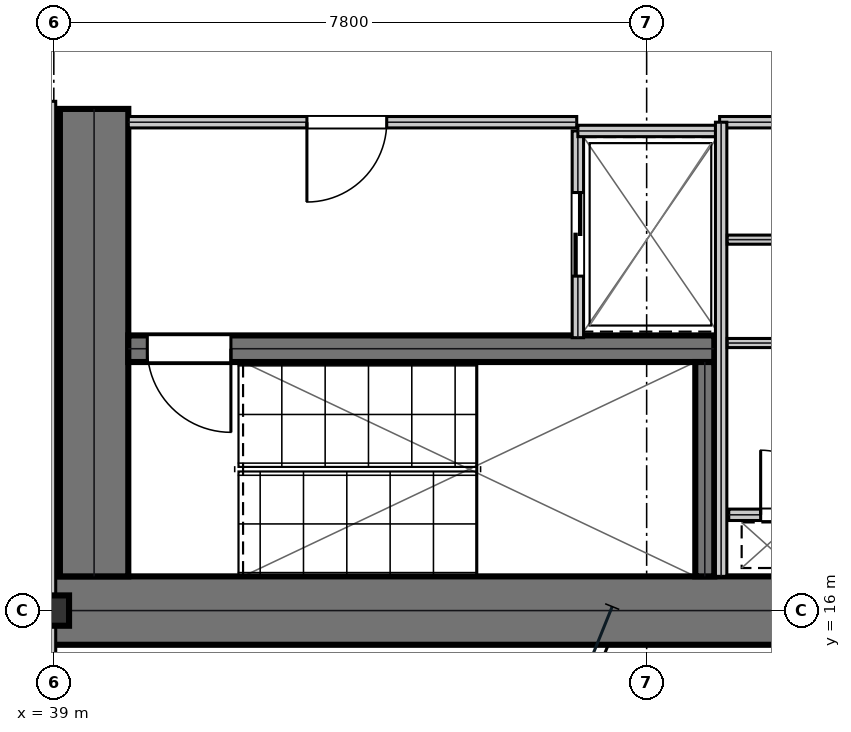
"""IFC4 building model, lengths in metres.
Left out: names, types, materials, properties, quantities, classifications, styles, units other than length and angle.
Written with IfcOpenShell. Run it as: python <this file> out.ifc"""

import sys

from ifc_helpers import new_model, si_unit, direction, frame, frame_2d, origin, origin_2d, place, context, subcontext, project, spatial, rectangle, i_section, extrude, element, fill, save


model = new_model("IFC4")
c1 = context("Model", 3, precision=1e-05, world=origin(), true_north=direction((0.0, 1.0)))
c2 = subcontext(c1, "Body", "Model", "MODEL_VIEW")
j1 = project(units=[si_unit("LENGTHUNIT", "METRE"), si_unit("PLANEANGLEUNIT", "RADIAN")], contexts=[c1])
p1 = place(None, origin())
s1 = spatial("IfcSite", under=j1, at=p1, CompositionType="ELEMENT")
p2 = place(p1, origin())
s2 = spatial("IfcBuilding", under=s1, at=p2, CompositionType="ELEMENT")
p3 = place(p2, frame((0.0, 0.0, 70.2)))
s3 = spatial("IfcBuildingStorey", under=s2, at=p3, CompositionType="ELEMENT", Elevation=70.2)
p4 = place(p3, frame((38.8, 16.0, 0.0), z_axis=(0.0, 0.0, 1.0), x_axis=(1.0, 0.0, 0.0)))
e1 = element("IfcWall", 1, at=p4, inside=s3, PredefinedType="SHEAR", context=c2, shape_type="SweptSolid", body=[
    extrude(rectangle(XDim=16.0, YDim=0.9, at=frame_2d((8.0, 0.0))), origin(), (0.0, 0.0, 1.0), 3.81),
])
p5 = place(p3, frame((39.53, 16.45, 0.0), z_axis=(0.0, 0.0, 1.0), x_axis=(0.0, 1.0, 0.0)))
e2 = element("IfcWall", 2, at=p5, inside=s3, PredefinedType="SHEAR", context=c2, shape_type="SweptSolid", body=[
    extrude(rectangle(XDim=6.15, YDim=0.9, at=frame_2d((3.075, 0.0))), origin(), (0.0, 0.0, 1.0), 3.81),
])
p6 = place(p3, frame((39.98, 19.445, 0.0), z_axis=(0.0, 0.0, 1.0), x_axis=(1.0, 0.0, 0.0)))
e3 = element("IfcWall", 3, at=p6, inside=s3, PredefinedType="SHEAR", context=c2, shape_type="SweptSolid", body=[
    extrude(rectangle(XDim=7.71, YDim=0.35, at=frame_2d((3.855, 0.0))), origin(), (0.0, 0.0, 1.0), 3.81),
])
p7 = place(p6, frame((0.25, 0.0, 0.0)))
e4 = element("IfcOpeningElement", 4, at=p7, cuts=e3, PredefinedType="OPENING", context=c2, shape_type="SweptSolid", body=[
    extrude(rectangle(XDim=1.1, YDim=2.15, at=frame_2d((0.55, 1.075))), frame((0.0, 0.185, 0.0), z_axis=(0.0, -1.0, 0.0), x_axis=(1.0, 0.0, 0.0)), (0.0, 0.0, 1.0), 0.37),
])
p8 = place(p3, frame((47.565, 16.45, 0.0), z_axis=(0.0, 0.0, 1.0), x_axis=(0.0, 1.0, 0.0)))
e5 = element("IfcWall", 5, at=p8, inside=s3, PredefinedType="SHEAR", context=c2, shape_type="SweptSolid", body=[
    extrude(rectangle(XDim=2.82, YDim=0.25, at=frame_2d((1.41, 0.0))), origin(), (0.0, 0.0, 1.0), 3.81),
])
p9 = place(p3, frame((39.0, 16.0, 0.0), z_axis=(0.0, 0.0, 1.0), x_axis=(1.0, 0.0, 0.0)))
e6 = element("IfcColumn", 6, at=p9, inside=s3, PredefinedType="COLUMN", context=c2, shape_type="SweptSolid", body=[
    extrude(i_section(OverallWidth=0.401, OverallDepth=0.399, WebThickness=0.025, FlangeThickness=0.04, at=origin_2d()), origin(), (0.0, 0.0, 1.0), 4.044),
])
p10 = place(p3, frame((39.98, 22.425, 0.0), z_axis=(0.0, 0.0, 1.0), x_axis=(1.0, 0.0, 0.0)))
e7 = element("IfcWall", 7, at=p10, inside=s3, PredefinedType="PARTITIONING", context=c2, shape_type="SweptSolid", body=[
    extrude(rectangle(XDim=5.9, YDim=0.15, at=frame_2d((2.95, 0.0))), origin(), (0.0, 0.0, 1.0), 3.81),
])
p11 = place(p10, frame((2.35, 0.0, 0.0)))
e8 = element("IfcOpeningElement", 8, at=p11, cuts=e7, PredefinedType="OPENING", context=c2, shape_type="SweptSolid", body=[
    extrude(rectangle(XDim=1.05, YDim=2.15, at=frame_2d((0.525, 1.075))), frame((0.0, 0.085, 0.0), z_axis=(0.0, -1.0, 0.0), x_axis=(1.0, 0.0, 0.0)), (0.0, 0.0, 1.0), 0.17),
])
p12 = place(p3, frame((45.895, 19.59, 0.0), z_axis=(0.0, 0.0, 1.0), x_axis=(0.0, 1.0, 0.0)))
e9 = element("IfcWall", 9, at=p12, inside=s3, PredefinedType="PARTITIONING", context=c2, shape_type="SweptSolid", body=[
    extrude(rectangle(XDim=2.72, YDim=0.15, at=frame_2d((1.36, 0.0))), origin(), (0.0, 0.0, 1.0), 3.81),
])
p13 = place(p12, frame((0.81, 0.0, 0.0)))
e10 = element("IfcOpeningElement", 10, at=p13, cuts=e9, PredefinedType="OPENING", context=c2, shape_type="SweptSolid", body=[
    extrude(rectangle(XDim=1.1, YDim=2.15, at=frame_2d((0.55, 1.075))), frame((0.0, 0.085, 0.0), z_axis=(0.0, -1.0, 0.0), x_axis=(1.0, 0.0, 0.0)), (0.0, 0.0, 1.0), 0.17),
])
p14 = place(p3, frame((45.895, 22.31, 0.0), z_axis=(0.0, 0.0, 1.0), x_axis=(1.0, 0.0, 0.0)))
e11 = element("IfcWall", 11, at=p14, inside=s3, PredefinedType="PARTITIONING", context=c2, shape_type="SweptSolid", body=[
    extrude(rectangle(XDim=1.915, YDim=0.15, at=frame_2d((0.958, 0.0))), origin(), (0.0, 0.0, 1.0), 3.81),
])
p15 = place(p3, frame((47.88, 17.26, 0.0), z_axis=(0.0, 0.0, 1.0), x_axis=(1.0, 0.0, 0.0)))
e12 = element("IfcWall", 12, at=p15, inside=s3, PredefinedType="PARTITIONING", context=c2, shape_type="SweptSolid", body=[
    extrude(rectangle(XDim=1.72, YDim=0.15, at=frame_2d((0.86, 0.0))), origin(), (0.0, 0.0, 1.0), 3.81),
])
p16 = place(p15, frame((0.42, 0.0, 0.0)))
e13 = element("IfcOpeningElement", 13, at=p16, cuts=e12, PredefinedType="OPENING", context=c2, shape_type="SweptSolid", body=[
    extrude(rectangle(XDim=0.85, YDim=2.15, at=frame_2d((0.425, 1.075))), frame((0.0, 0.085, 0.0), z_axis=(0.0, -1.0, 0.0), x_axis=(1.0, 0.0, 0.0)), (0.0, 0.0, 1.0), 0.17),
])
p17 = place(p3, frame((47.76, 22.425, 0.0), z_axis=(0.0, 0.0, 1.0), x_axis=(1.0, 0.0, 0.0)))
e14 = element("IfcWall", 14, at=p17, inside=s3, PredefinedType="PARTITIONING", context=c2, shape_type="SweptSolid", body=[
    extrude(rectangle(XDim=1.96, YDim=0.15, at=frame_2d((0.98, 0.0))), origin(), (0.0, 0.0, 1.0), 3.81),
])
p18 = place(p3, frame((47.78, 16.45, 0.0), z_axis=(0.0, 0.0, 1.0), x_axis=(0.0, 1.0, 0.0)))
e15 = element("IfcWall", 15, at=p18, inside=s3, PredefinedType="PARTITIONING", context=c2, shape_type="SweptSolid", body=[
    extrude(rectangle(XDim=5.975, YDim=0.15, at=frame_2d((2.988, 0.0))), origin(), (0.0, 0.0, 1.0), 3.81),
])
for number, where, z_axis, x_axis in (
    (16, (47.86, 19.52, 0.0), (0.0, 0.0, 1.0), (1.0, 0.0, 0.0)),
    (17, (47.86, 20.88, 0.0), (0.0, 0.0, 1.0), (1.0, 0.0, 0.0)),
):
    element("IfcWall", number, at=place(p3, frame(where, z_axis=z_axis, x_axis=x_axis)), inside=s3, PredefinedType="PARTITIONING", context=c2, shape_type="SweptSolid", body=[
        extrude(rectangle(XDim=1.76, YDim=0.12, at=frame_2d((0.88, 0.0))), origin(), (0.0, 0.0, 1.0), 3.81),
    ])
p19 = place(p3, frame((38.95, 14.5, 0.0), z_axis=(0.0, 0.0, 1.0), x_axis=(0.0, 1.0, 0.0)))
e18 = element("IfcWall", 18, at=p19, inside=s3, PredefinedType="PARTITIONING", context=c2, shape_type="SweptSolid", body=[
    extrude(rectangle(XDim=8.2, YDim=0.15, at=frame_2d((4.1, 0.0))), origin(), (0.0, 0.0, 1.0), 3.181),
])
p20 = place(p11, frame((1.05, 0.0, 0.0), z_axis=(0.0, 0.0, 1.0), x_axis=(-1.0, 0.0, 0.0)))
e19 = element("IfcDoor", 19, at=p20, inside=s3, OperationType="SINGLE_SWING_RIGHT", PredefinedType="DOOR", context=c2, shape_type="SweptSolid", body=[
    extrude(rectangle(XDim=1.05, YDim=2.15, at=frame_2d((0.525, 1.075))), frame((0.0, 0.025, 0.0), z_axis=(0.0, -1.0, 0.0), x_axis=(1.0, 0.0, 0.0)), (0.0, 0.0, 1.0), 0.05),
])
fill(e8, e19)
p21 = place(p13, frame((1.1, 0.0, 0.0), z_axis=(0.0, 0.0, 1.0), x_axis=(-1.0, 0.0, 0.0)))
e20 = element("IfcDoor", 20, at=p21, inside=s3, OperationType="DOUBLE_DOOR_SLIDING", PredefinedType="DOOR", context=c2, shape_type="SweptSolid", body=[
    extrude(rectangle(XDim=1.1, YDim=2.15, at=frame_2d((0.55, 1.075))), frame((0.0, 0.025, 0.0), z_axis=(0.0, -1.0, 0.0), x_axis=(1.0, 0.0, 0.0)), (0.0, 0.0, 1.0), 0.05),
])
fill(e10, e20)
p22 = place(p16, origin())
e21 = element("IfcDoor", 21, at=p22, inside=s3, OperationType="SINGLE_SWING_LEFT", PredefinedType="TRAPDOOR", context=c2, shape_type="SweptSolid", body=[
    extrude(rectangle(XDim=0.85, YDim=2.15, at=frame_2d((0.425, 1.075))), frame((0.0, 0.025, 0.0), z_axis=(0.0, -1.0, 0.0), x_axis=(1.0, 0.0, 0.0)), (0.0, 0.0, 1.0), 0.05),
])
fill(e13, e21)
p23 = place(p7, frame((1.1, 0.0, 0.0), z_axis=(0.0, 0.0, 1.0), x_axis=(-1.0, 0.0, 0.0)))
e22 = element("IfcDoor", 22, at=p23, inside=s3, OperationType="SINGLE_SWING_LEFT", PredefinedType="DOOR", context=c2, shape_type="SweptSolid", body=[
    extrude(rectangle(XDim=1.1, YDim=2.15, at=frame_2d((0.55, 1.075))), frame((0.0, 0.025, 0.0), z_axis=(0.0, -1.0, 0.0), x_axis=(1.0, 0.0, 0.0)), (0.0, 0.0, 1.0), 0.05),
])
fill(e4, e22)
save(model, sys.argv[1])
